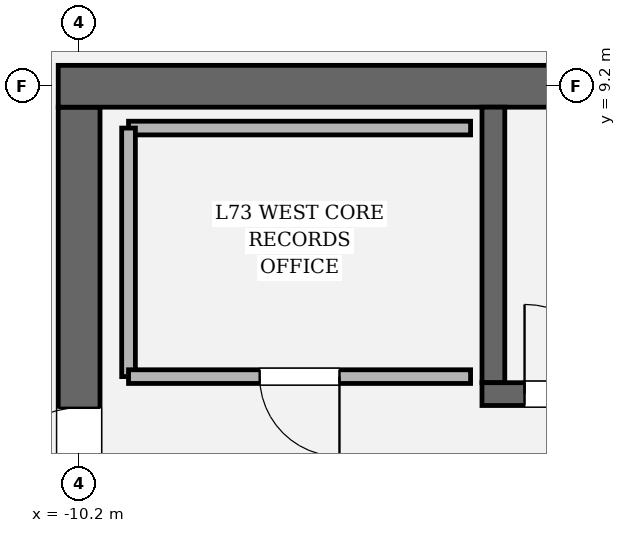
"""IFC4 building model, lengths in metres.
Left out: names, types, materials, properties, quantities, classifications, styles, units other than length and angle.
Written with IfcOpenShell. Run it as: python <this file> out.ifc"""

import sys

from ifc_helpers import new_model, si_unit, direction, frame, frame_2d, origin, place, context, subcontext, project, spatial, rectangle, extrude, element, fill, save


model = new_model("IFC4")
c1 = context("Model", 3, precision=1e-05, world=origin(), true_north=direction((0.0, 1.0)))
c2 = subcontext(c1, "Body", "Model", "MODEL_VIEW")
j1 = project(units=[si_unit("LENGTHUNIT", "METRE"), si_unit("PLANEANGLEUNIT", "RADIAN")], contexts=[c1])
p1 = place(None, origin())
s1 = spatial("IfcSite", under=j1, at=p1, CompositionType="ELEMENT")
p2 = place(p1, origin())
s2 = spatial("IfcBuilding", under=s1, at=p2, CompositionType="ELEMENT")
p3 = place(p2, frame((0.0, 0.0, 309.0)))
s3 = spatial("IfcBuildingStorey", under=s2, at=p3, CompositionType="ELEMENT", Elevation=309.0)
p4 = place(p3, frame((-10.2, -8.925, 0.0), z_axis=(0.0, 0.0, 1.0), x_axis=(0.0, 1.0, 0.0)))
e1 = element("IfcWall", 1, at=p4, inside=s3, PredefinedType="SHEAR", context=c2, shape_type="SweptSolid", body=[
    extrude(rectangle(XDim=17.85, YDim=0.55, at=frame_2d((8.925, 0.0))), origin(), (0.0, 0.0, 1.0), 4.2),
])
p5 = place(p4, frame((12.715, 0.0, 0.0)))
e2 = element("IfcOpeningElement", 2, at=p5, cuts=e1, PredefinedType="OPENING", context=c2, shape_type="SweptSolid", body=[
    extrude(rectangle(XDim=1.18, YDim=2.2, at=frame_2d((0.59, 1.1))), frame((0.0, 0.285, 0.0), z_axis=(0.0, -1.0, 0.0), x_axis=(1.0, 0.0, 0.0)), (0.0, 0.0, 1.0), 0.57),
])
p6 = place(p3, frame((-10.475, 9.2, 0.0), z_axis=(0.0, 0.0, 1.0), x_axis=(1.0, 0.0, 0.0)))
e3 = element("IfcWall", 3, at=p6, inside=s3, PredefinedType="SHEAR", context=c2, shape_type="SweptSolid", body=[
    extrude(rectangle(XDim=20.95, YDim=0.55, at=frame_2d((10.475, 0.0))), origin(), (0.0, 0.0, 1.0), 4.2),
])
p7 = place(p3, frame((-4.75, 5.3, 0.0), z_axis=(0.0, 0.0, 1.0), x_axis=(0.0, 1.0, 0.0)))
e4 = element("IfcWall", 4, at=p7, inside=s3, PredefinedType="SOLIDWALL", context=c2, shape_type="SweptSolid", body=[
    extrude(rectangle(XDim=3.625, YDim=0.3, at=frame_2d((1.812, 0.0))), origin(), (0.0, 0.0, 1.0), 4.2),
])
p8 = place(p3, frame((-4.9, 5.15, 0.0), z_axis=(0.0, 0.0, 1.0), x_axis=(1.0, 0.0, 0.0)))
e5 = element("IfcWall", 5, at=p8, inside=s3, PredefinedType="SOLIDWALL", context=c2, shape_type="SweptSolid", body=[
    extrude(rectangle(XDim=9.8, YDim=0.3, at=frame_2d((4.9, 0.0))), origin(), (0.0, 0.0, 1.0), 4.2),
])
p9 = place(p8, frame((0.56, 0.0, 0.0)))
e6 = element("IfcOpeningElement", 6, at=p9, cuts=e5, PredefinedType="OPENING", context=c2, shape_type="SweptSolid", body=[
    extrude(rectangle(XDim=1.18, YDim=2.2, at=frame_2d((0.59, 1.1))), frame((0.0, 0.16, 0.0), z_axis=(0.0, -1.0, 0.0), x_axis=(1.0, 0.0, 0.0)), (0.0, 0.0, 1.0), 0.32),
])
p10 = place(p3, frame((-5.05, 8.65, 0.0), z_axis=(0.0, 0.0, 1.0), x_axis=(-1.0, 0.0, 0.0)))
e7 = element("IfcWall", 7, at=p10, inside=s3, PredefinedType="PARTITIONING", context=c2, shape_type="SweptSolid", body=[
    extrude(rectangle(XDim=4.5, YDim=0.18, at=frame_2d((2.25, 0.0))), origin(), (0.0, 0.0, 1.0), 4.0),
])
p11 = place(p3, frame((-9.55, 8.65, 0.0), z_axis=(0.0, 0.0, 1.0), x_axis=(0.0, -1.0, 0.0)))
e8 = element("IfcWall", 8, at=p11, inside=s3, PredefinedType="PARTITIONING", context=c2, shape_type="SweptSolid", body=[
    extrude(rectangle(XDim=3.27, YDim=0.18, at=frame_2d((1.635, 0.0))), origin(), (0.0, 0.0, 1.0), 4.0),
])
p12 = place(p3, frame((-9.55, 5.38, 0.0), z_axis=(0.0, 0.0, 1.0), x_axis=(1.0, 0.0, 0.0)))
e9 = element("IfcWall", 9, at=p12, inside=s3, PredefinedType="PARTITIONING", context=c2, shape_type="SweptSolid", body=[
    extrude(rectangle(XDim=4.5, YDim=0.18, at=frame_2d((2.25, 0.0))), origin(), (0.0, 0.0, 1.0), 4.0),
])
p13 = place(p12, frame((1.725, 0.0, 0.0)))
e10 = element("IfcOpeningElement", 10, at=p13, cuts=e9, PredefinedType="OPENING", context=c2, shape_type="SweptSolid", body=[
    extrude(rectangle(XDim=1.05, YDim=2.2, at=frame_2d((0.525, 1.1))), frame((0.0, 0.1, 0.0), z_axis=(0.0, -1.0, 0.0), x_axis=(1.0, 0.0, 0.0)), (0.0, 0.0, 1.0), 0.2),
])
p14 = place(p9, origin())
e11 = element("IfcDoor", 11, at=p14, inside=s3, OperationType="SINGLE_SWING_LEFT", PredefinedType="DOOR", context=c2, shape_type="SweptSolid", body=[
    extrude(rectangle(XDim=1.18, YDim=2.2, at=frame_2d((0.59, 1.1))), frame((0.0, 0.025, 0.0), z_axis=(0.0, -1.0, 0.0), x_axis=(1.0, 0.0, 0.0)), (0.0, 0.0, 1.0), 0.05),
])
fill(e6, e11)
p15 = place(p5, origin())
e12 = element("IfcDoor", 12, at=p15, inside=s3, OperationType="SINGLE_SWING_LEFT", PredefinedType="DOOR", context=c2, shape_type="SweptSolid", body=[
    extrude(rectangle(XDim=1.18, YDim=2.2, at=frame_2d((0.59, 1.1))), frame((0.0, 0.025, 0.0), z_axis=(0.0, -1.0, 0.0), x_axis=(1.0, 0.0, 0.0)), (0.0, 0.0, 1.0), 0.05),
])
fill(e2, e12)
p16 = place(p13, origin())
e13 = element("IfcDoor", 13, at=p16, inside=s3, OperationType="SINGLE_SWING_RIGHT", PredefinedType="DOOR", context=c2, shape_type="SweptSolid", body=[
    extrude(rectangle(XDim=1.05, YDim=2.2, at=frame_2d((0.525, 1.1))), frame((0.0, 0.025, 0.0), z_axis=(0.0, -1.0, 0.0), x_axis=(1.0, 0.0, 0.0)), (0.0, 0.0, 1.0), 0.05),
])
fill(e10, e13)
save(model, sys.argv[1])
